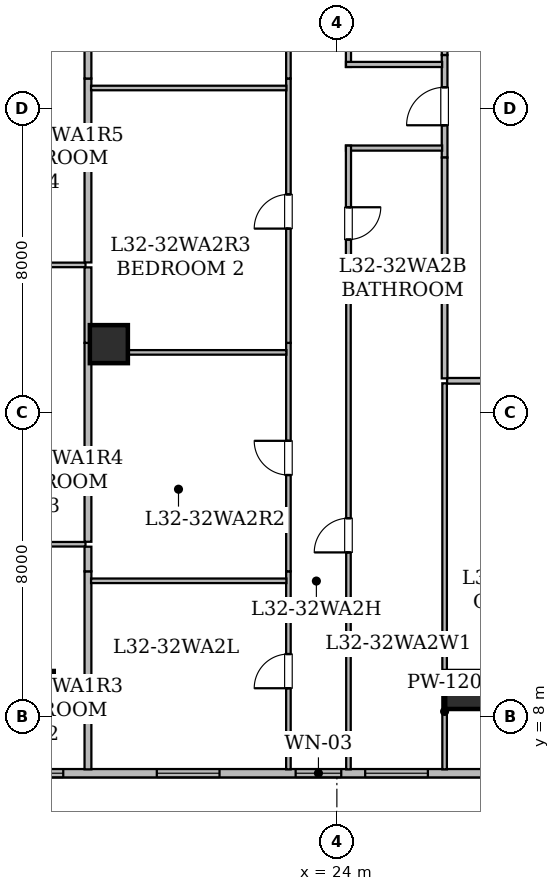
"""IFC4 building model, lengths in metres.
Left out: names, types, materials, properties, quantities, classifications, styles, units other than length and angle.
Written with IfcOpenShell. Run it as: python <this file> out.ifc"""

import sys

from ifc_helpers import new_model, si_unit, direction, frame, frame_2d, origin, origin_2d, place, context, subcontext, project, spatial, rectangle, hollow_rectangle, extrude, element, fill, save


model = new_model("IFC4")
c1 = context("Model", 3, precision=1e-05, world=origin(), true_north=direction((0.0, 1.0)))
c2 = subcontext(c1, "Body", "Model", "MODEL_VIEW")
j1 = project(units=[si_unit("LENGTHUNIT", "METRE"), si_unit("PLANEANGLEUNIT", "RADIAN")], contexts=[c1])
p1 = place(None, origin())
s1 = spatial("IfcSite", under=j1, at=p1, CompositionType="ELEMENT")
p2 = place(p1, origin())
s2 = spatial("IfcBuilding", under=s1, at=p2, CompositionType="ELEMENT")
p3 = place(p2, frame((0.0, 0.0, 127.45)))
s3 = spatial("IfcBuildingStorey", under=s2, at=p3, CompositionType="ELEMENT", Elevation=127.45)
for number, where, z_axis, x_axis in (
    (1, (16.05, 8.7, 0.0), (0.0, 0.0, 1.0), (1.0, 0.0, 0.0)),
    (2, (27.35, 8.7, 0.0), (0.0, 0.0, 1.0), (1.0, 0.0, 0.0)),
    (3, (18.0, 17.8, 0.0), (0.0, 0.0, 1.0), (1.0, 0.0, 0.0)),
):
    element("IfcColumn", number, at=place(p3, frame(where, z_axis=z_axis, x_axis=x_axis)), inside=s3, PredefinedType="COLUMN", context=c2, shape_type="SweptSolid", body=[
        extrude(hollow_rectangle(XDim=1.0, YDim=1.0, WallThickness=0.05, at=origin_2d()), origin(), (0.0, 0.0, 1.0), 3.65),
    ])
p4 = place(p3, frame((52.283, 6.51, 0.0), z_axis=(0.0, 0.0, 1.0), x_axis=(-1.0, 0.0, 0.0)))
e4 = element("IfcWall", 4, at=p4, inside=s3, PredefinedType="STANDARD", context=c2, shape_type="SweptSolid", body=[
    extrude(rectangle(XDim=38.568, YDim=0.22, at=frame_2d((19.284, 0.0))), origin(), (0.0, 0.0, 1.0), 3.43),
])
p5 = place(p4, frame((20.408, 0.0, 0.85)))
e5 = element("IfcOpeningElement", 5, at=p5, cuts=e4, PredefinedType="OPENING", context=c2, shape_type="SweptSolid", body=[
    extrude(rectangle(XDim=1.65, YDim=1.55, at=frame_2d((0.825, 0.775))), frame((0.0, 0.12, 0.0), z_axis=(0.0, -1.0, 0.0), x_axis=(1.0, 0.0, 0.0)), (0.0, 0.0, 1.0), 0.24),
])
p6 = place(p4, frame((35.483, 0.0, 0.85)))
e6 = element("IfcOpeningElement", 6, at=p6, cuts=e4, PredefinedType="OPENING", context=c2, shape_type="SweptSolid", body=[
    extrude(rectangle(XDim=1.65, YDim=1.55, at=frame_2d((0.825, 0.775))), frame((0.0, 0.12, 0.0), z_axis=(0.0, -1.0, 0.0), x_axis=(1.0, 0.0, 0.0)), (0.0, 0.0, 1.0), 0.24),
])
p7 = place(p4, frame((25.888, 0.0, 0.85)))
e7 = element("IfcOpeningElement", 7, at=p7, cuts=e4, PredefinedType="OPENING", context=c2, shape_type="SweptSolid", body=[
    extrude(rectangle(XDim=1.65, YDim=1.55, at=frame_2d((0.825, 0.775))), frame((0.0, 0.12, 0.0), z_axis=(0.0, -1.0, 0.0), x_axis=(1.0, 0.0, 0.0)), (0.0, 0.0, 1.0), 0.24),
])
p8 = place(p4, frame((28.168, 0.0, 0.8)))
e8 = element("IfcOpeningElement", 8, at=p8, cuts=e4, PredefinedType="OPENING", context=c2, shape_type="SweptSolid", body=[
    extrude(rectangle(XDim=1.2, YDim=1.5, at=frame_2d((0.6, 0.75))), frame((0.0, 0.12, 0.0), z_axis=(0.0, -1.0, 0.0), x_axis=(1.0, 0.0, 0.0)), (0.0, 0.0, 1.0), 0.24),
])
p9 = place(p4, frame((31.371, 0.0, 0.85)))
e9 = element("IfcOpeningElement", 9, at=p9, cuts=e4, PredefinedType="OPENING", context=c2, shape_type="SweptSolid", body=[
    extrude(rectangle(XDim=1.65, YDim=1.55, at=frame_2d((0.825, 0.775))), frame((0.0, 0.12, 0.0), z_axis=(0.0, -1.0, 0.0), x_axis=(1.0, 0.0, 0.0)), (0.0, 0.0, 1.0), 0.24),
])
p10 = place(p4, frame((13.143, 0.0, 0.85)))
e10 = element("IfcOpeningElement", 10, at=p10, cuts=e4, PredefinedType="OPENING", context=c2, shape_type="SweptSolid", body=[
    extrude(rectangle(XDim=1.65, YDim=1.55, at=frame_2d((0.825, 0.775))), frame((0.0, 0.12, 0.0), z_axis=(0.0, -1.0, 0.0), x_axis=(1.0, 0.0, 0.0)), (0.0, 0.0, 1.0), 0.24),
])
p11 = place(p4, frame((6.688, 0.0, 0.85)))
e11 = element("IfcOpeningElement", 11, at=p11, cuts=e4, PredefinedType="OPENING", context=c2, shape_type="SweptSolid", body=[
    extrude(rectangle(XDim=1.65, YDim=1.55, at=frame_2d((0.825, 0.775))), frame((0.0, 0.12, 0.0), z_axis=(0.0, -1.0, 0.0), x_axis=(1.0, 0.0, 0.0)), (0.0, 0.0, 1.0), 0.24),
])
p12 = place(p3, frame((35.514, 16.835, 0.0), z_axis=(0.0, 0.0, 1.0), x_axis=(-1.0, 0.0, 0.0)))
e12 = element("IfcWall", 12, at=p12, inside=s3, PredefinedType="STANDARD", context=c2, shape_type="SweptSolid", body=[
    extrude(rectangle(XDim=8.614, YDim=0.15, at=frame_2d((4.307, 0.0))), origin(), (0.0, 0.0, 1.0), 2.647),
])
p13 = place(p12, frame((3.753, 0.0, 0.0)))
e13 = element("IfcOpeningElement", 13, at=p13, cuts=e12, PredefinedType="OPENING", context=c2, shape_type="SweptSolid", body=[
    extrude(rectangle(XDim=1.15, YDim=2.2, at=frame_2d((0.575, 1.1))), frame((0.0, 0.085, 0.0), z_axis=(0.0, -1.0, 0.0), x_axis=(1.0, 0.0, 0.0)), (0.0, 0.0, 1.0), 0.17),
])
p14 = place(p3, frame((26.835, 16.9, 0.0), z_axis=(0.0, 0.0, 1.0), x_axis=(0.0, 1.0, 0.0)))
e14 = element("IfcWall", 14, at=p14, inside=s3, PredefinedType="STANDARD", context=c2, shape_type="SweptSolid", body=[
    extrude(rectangle(XDim=2.343, YDim=0.15, at=frame_2d((1.171, 0.0))), origin(), (0.0, 0.0, 1.0), 2.647),
])
p15 = place(p3, frame((26.835, 22.71, 0.0), z_axis=(0.0, 0.0, 1.0), x_axis=(0.0, 1.0, 0.0)))
e15 = element("IfcWall", 15, at=p15, inside=s3, PredefinedType="STANDARD", context=c2, shape_type="SweptSolid", body=[
    extrude(rectangle(XDim=2.698, YDim=0.15, at=frame_2d((1.349, 0.0))), origin(), (0.0, 0.0, 1.0), 3.43),
])
p16 = place(p15, frame((0.849, 0.0, 0.0)))
e16 = element("IfcOpeningElement", 16, at=p16, cuts=e15, PredefinedType="OPENING", context=c2, shape_type="SweptSolid", body=[
    extrude(rectangle(XDim=1.0, YDim=2.15, at=frame_2d((0.5, 1.075))), frame((0.0, 0.085, 0.0), z_axis=(0.0, -1.0, 0.0), x_axis=(1.0, 0.0, 0.0)), (0.0, 0.0, 1.0), 0.17),
])
p17 = place(p3, frame((26.835, 19.243, 0.0), z_axis=(0.0, 0.0, 1.0), x_axis=(0.0, 1.0, 0.0)))
e17 = element("IfcWall", 17, at=p17, inside=s3, PredefinedType="STANDARD", context=c2, shape_type="SweptSolid", body=[
    extrude(rectangle(XDim=3.467, YDim=0.15, at=frame_2d((1.733, 0.0))), origin(), (0.0, 0.0, 1.0), 3.43),
])
p18 = place(p3, frame((26.835, 25.408, 0.0), z_axis=(0.0, 0.0, 1.0), x_axis=(0.0, 1.0, 0.0)))
e18 = element("IfcWall", 18, at=p18, inside=s3, PredefinedType="STANDARD", context=c2, shape_type="SweptSolid", body=[
    extrude(rectangle(XDim=4.467, YDim=0.15, at=frame_2d((2.233, 0.0))), origin(), (0.0, 0.0, 1.0), 3.107),
])
p19 = place(p3, frame((26.835, 6.612, 0.0), z_axis=(0.0, 0.0, 1.0), x_axis=(0.0, 1.0, 0.0)))
e19 = element("IfcWall", 19, at=p19, inside=s3, PredefinedType="PARTITIONING", context=c2, shape_type="SweptSolid", body=[
    extrude(rectangle(XDim=10.158, YDim=0.12, at=frame_2d((5.079, 0.0))), origin(), (0.0, 0.0, 1.0), 2.876),
])
p20 = place(p3, frame((14.286, 12.535, 0.0), z_axis=(0.0, 0.0, 1.0), x_axis=(1.0, 0.0, 0.0)))
e20 = element("IfcWall", 20, at=p20, inside=s3, PredefinedType="PARTITIONING", context=c2, shape_type="SweptSolid", body=[
    extrude(rectangle(XDim=3.099, YDim=0.12, at=frame_2d((1.55, 0.0))), origin(), (0.0, 0.0, 1.0), 2.647),
])
p21 = place(p3, frame((17.45, 11.822, 0.0), z_axis=(0.0, 0.0, 1.0), x_axis=(0.0, -1.0, 0.0)))
e21 = element("IfcWall", 21, at=p21, inside=s3, PredefinedType="STANDARD", context=c2, shape_type="SweptSolid", body=[
    extrude(rectangle(XDim=5.21, YDim=0.18, at=frame_2d((2.605, 0.0))), origin(), (0.0, 0.0, 1.0), 2.876),
])
p22 = place(p3, frame((17.45, 12.47, 0.0), z_axis=(0.0, 0.0, 1.0), x_axis=(0.0, -1.0, 0.0)))
e22 = element("IfcWall", 22, at=p22, inside=s3, PredefinedType="STANDARD", context=c2, shape_type="SweptSolid", body=[
    extrude(rectangle(XDim=0.648, YDim=0.18, at=frame_2d((0.324, 0.0))), origin(), (0.0, 0.0, 1.0), 3.43),
])
p23 = place(p3, frame((14.286, 19.885, 0.0), z_axis=(0.0, 0.0, 1.0), x_axis=(1.0, 0.0, 0.0)))
e23 = element("IfcWall", 23, at=p23, inside=s3, PredefinedType="PARTITIONING", context=c2, shape_type="SweptSolid", body=[
    extrude(rectangle(XDim=3.099, YDim=0.12, at=frame_2d((1.55, 0.0))), origin(), (0.0, 0.0, 1.0), 3.43),
])
p24 = place(p3, frame((17.45, 17.833, 0.0), z_axis=(0.0, 0.0, 1.0), x_axis=(0.0, -1.0, 0.0)))
e24 = element("IfcWall", 24, at=p24, inside=s3, PredefinedType="STANDARD", context=c2, shape_type="SweptSolid", body=[
    extrude(rectangle(XDim=5.233, YDim=0.18, at=frame_2d((2.616, 0.0))), origin(), (0.0, 0.0, 1.0), 2.647),
])
p25 = place(p3, frame((17.45, 19.82, 0.0), z_axis=(0.0, 0.0, 1.0), x_axis=(0.0, -1.0, 0.0)))
e25 = element("IfcWall", 25, at=p25, inside=s3, PredefinedType="STANDARD", context=c2, shape_type="SweptSolid", body=[
    extrude(rectangle(XDim=1.987, YDim=0.18, at=frame_2d((0.994, 0.0))), origin(), (0.0, 0.0, 1.0), 2.647),
])
p26 = place(p3, frame((17.45, 24.789, 0.0), z_axis=(0.0, 0.0, 1.0), x_axis=(0.0, -1.0, 0.0)))
e26 = element("IfcWall", 26, at=p26, inside=s3, PredefinedType="STANDARD", context=c2, shape_type="SweptSolid", body=[
    extrude(rectangle(XDim=4.839, YDim=0.18, at=frame_2d((2.419, 0.0))), origin(), (0.0, 0.0, 1.0), 3.43),
])
p27 = place(p3, frame((17.45, 28.56, 0.0), z_axis=(0.0, 0.0, 1.0), x_axis=(0.0, -1.0, 0.0)))
e27 = element("IfcWall", 27, at=p27, inside=s3, PredefinedType="STANDARD", context=c2, shape_type="SweptSolid", body=[
    extrude(rectangle(XDim=3.771, YDim=0.18, at=frame_2d((1.885, 0.0))), origin(), (0.0, 0.0, 1.0), 3.43),
])
p28 = place(p3, frame((24.305, 6.612, 0.0), z_axis=(0.0, 0.0, 1.0), x_axis=(0.0, 1.0, 0.0)))
e28 = element("IfcWall", 28, at=p28, inside=s3, PredefinedType="PARTITIONING", context=c2, shape_type="SweptSolid", body=[
    extrude(rectangle(XDim=12.317, YDim=0.12, at=frame_2d((6.158, 0.0))), origin(), (0.0, 0.0, 1.0), 2.647),
])
p29 = place(p28, frame((5.708, 0.0, 0.0)))
e29 = element("IfcOpeningElement", 29, at=p29, cuts=e28, PredefinedType="OPENING", context=c2, shape_type="SweptSolid", body=[
    extrude(rectangle(XDim=0.9, YDim=2.1, at=frame_2d((0.45, 1.05))), frame((0.0, 0.07, 0.0), z_axis=(0.0, -1.0, 0.0), x_axis=(1.0, 0.0, 0.0)), (0.0, 0.0, 1.0), 0.14),
])
p30 = place(p3, frame((24.37, 18.994, 0.0), z_axis=(0.0, 0.0, 1.0), x_axis=(1.0, 0.0, 0.0)))
e30 = element("IfcWall", 30, at=p30, inside=s3, PredefinedType="PARTITIONING", context=c2, shape_type="SweptSolid", body=[
    extrude(rectangle(XDim=2.4, YDim=0.135, at=frame_2d((1.2, 0.0))), origin(), (0.0, 0.0, 1.0), 2.647),
])
p31 = place(p3, frame((26.77, 22.959, 0.0), z_axis=(0.0, 0.0, 1.0), x_axis=(-1.0, 0.0, 0.0)))
e31 = element("IfcWall", 31, at=p31, inside=s3, PredefinedType="PARTITIONING", context=c2, shape_type="SweptSolid", body=[
    extrude(rectangle(XDim=2.53, YDim=0.135, at=frame_2d((1.265, 0.0))), origin(), (0.0, 0.0, 1.0), 3.43),
])
p32 = place(p3, frame((24.305, 23.024, 0.0), z_axis=(0.0, 0.0, 1.0), x_axis=(0.0, -1.0, 0.0)))
e32 = element("IfcWall", 32, at=p32, inside=s3, PredefinedType="PARTITIONING", context=c2, shape_type="SweptSolid", body=[
    extrude(rectangle(XDim=4.095, YDim=0.135, at=frame_2d((2.047, 0.0))), origin(), (0.0, 0.0, 1.0), 3.43),
])
p33 = place(p32, frame((1.622, 0.0, 0.0)))
e33 = element("IfcOpeningElement", 33, at=p33, cuts=e32, PredefinedType="OPENING", context=c2, shape_type="SweptSolid", body=[
    extrude(rectangle(XDim=0.85, YDim=2.1, at=frame_2d((0.425, 1.05))), frame((0.0, 0.077, 0.0), z_axis=(0.0, -1.0, 0.0), x_axis=(1.0, 0.0, 0.0)), (0.0, 0.0, 1.0), 0.155),
])
p34 = place(p3, frame((24.305, 30.189, 0.0), z_axis=(0.0, 0.0, 1.0), x_axis=(0.0, -1.0, 0.0)))
e34 = element("IfcWall", 34, at=p34, inside=s3, PredefinedType="PARTITIONING", context=c2, shape_type="SweptSolid", body=[
    extrude(rectangle(XDim=5.095, YDim=0.135, at=frame_2d((2.547, 0.0))), origin(), (0.0, 0.0, 1.0), 3.107),
])
p35 = place(p34, frame((2.123, 0.0, 0.0)))
e35 = element("IfcOpeningElement", 35, at=p35, cuts=e34, PredefinedType="OPENING", context=c2, shape_type="SweptSolid", body=[
    extrude(rectangle(XDim=0.85, YDim=2.1, at=frame_2d((0.425, 1.05))), frame((0.0, 0.077, 0.0), z_axis=(0.0, -1.0, 0.0), x_axis=(1.0, 0.0, 0.0)), (0.0, 0.0, 1.0), 0.155),
])
p36 = place(p3, frame((24.24, 25.159, 0.0), z_axis=(0.0, 0.0, 1.0), x_axis=(1.0, 0.0, 0.0)))
e36 = element("IfcWall", 36, at=p36, inside=s3, PredefinedType="PARTITIONING", context=c2, shape_type="SweptSolid", body=[
    extrude(rectangle(XDim=2.53, YDim=0.135, at=frame_2d((1.265, 0.0))), origin(), (0.0, 0.0, 1.0), 3.43),
])
p37 = place(p3, frame((22.725, 6.612, 0.0), z_axis=(0.0, 0.0, 1.0), x_axis=(0.0, 1.0, 0.0)))
e37 = element("IfcWall", 37, at=p37, inside=s3, PredefinedType="PARTITIONING", context=c2, shape_type="SweptSolid", body=[
    extrude(rectangle(XDim=5.21, YDim=0.12, at=frame_2d((2.605, 0.0))), origin(), (0.0, 0.0, 1.0), 2.876),
])
p38 = place(p37, frame((2.134, 0.0, 0.0)))
e38 = element("IfcOpeningElement", 38, at=p38, cuts=e37, PredefinedType="OPENING", context=c2, shape_type="SweptSolid", body=[
    extrude(rectangle(XDim=0.9, YDim=2.1, at=frame_2d((0.45, 1.05))), frame((0.0, 0.07, 0.0), z_axis=(0.0, -1.0, 0.0), x_axis=(1.0, 0.0, 0.0)), (0.0, 0.0, 1.0), 0.14),
])
p39 = place(p3, frame((22.725, 11.822, 0.0), z_axis=(0.0, 0.0, 1.0), x_axis=(0.0, 1.0, 0.0)))
e39 = element("IfcWall", 39, at=p39, inside=s3, PredefinedType="PARTITIONING", context=c2, shape_type="SweptSolid", body=[
    extrude(rectangle(XDim=6.011, YDim=0.12, at=frame_2d((3.005, 0.0))), origin(), (0.0, 0.0, 1.0), 3.43),
])
p40 = place(p39, frame((2.534, 0.0, 0.0)))
e40 = element("IfcOpeningElement", 40, at=p40, cuts=e39, PredefinedType="OPENING", context=c2, shape_type="SweptSolid", body=[
    extrude(rectangle(XDim=0.9, YDim=2.1, at=frame_2d((0.45, 1.05))), frame((0.0, 0.07, 0.0), z_axis=(0.0, -1.0, 0.0), x_axis=(1.0, 0.0, 0.0)), (0.0, 0.0, 1.0), 0.14),
])
p41 = place(p3, frame((22.725, 17.833, 0.0), z_axis=(0.0, 0.0, 1.0), x_axis=(0.0, 1.0, 0.0)))
e41 = element("IfcWall", 41, at=p41, inside=s3, PredefinedType="PARTITIONING", context=c2, shape_type="SweptSolid", body=[
    extrude(rectangle(XDim=6.956, YDim=0.12, at=frame_2d((3.478, 0.0))), origin(), (0.0, 0.0, 1.0), 2.647),
])
p42 = place(p41, frame((3.007, 0.0, 0.0)))
e42 = element("IfcOpeningElement", 42, at=p42, cuts=e41, PredefinedType="OPENING", context=c2, shape_type="SweptSolid", body=[
    extrude(rectangle(XDim=0.9, YDim=2.1, at=frame_2d((0.45, 1.05))), frame((0.0, 0.07, 0.0), z_axis=(0.0, -1.0, 0.0), x_axis=(1.0, 0.0, 0.0)), (0.0, 0.0, 1.0), 0.14),
])
p43 = place(p3, frame((22.725, 24.789, 0.0), z_axis=(0.0, 0.0, 1.0), x_axis=(0.0, 1.0, 0.0)))
e43 = element("IfcWall", 43, at=p43, inside=s3, PredefinedType="PARTITIONING", context=c2, shape_type="SweptSolid", body=[
    extrude(rectangle(XDim=4.117, YDim=0.12, at=frame_2d((2.059, 0.0))), origin(), (0.0, 0.0, 1.0), 3.107),
])
p44 = place(p43, frame((1.588, 0.0, 0.0)))
e44 = element("IfcOpeningElement", 44, at=p44, cuts=e43, PredefinedType="OPENING", context=c2, shape_type="SweptSolid", body=[
    extrude(rectangle(XDim=0.9, YDim=2.1, at=frame_2d((0.45, 1.05))), frame((0.0, 0.07, 0.0), z_axis=(0.0, -1.0, 0.0), x_axis=(1.0, 0.0, 0.0)), (0.0, 0.0, 1.0), 0.14),
])
p45 = place(p3, frame((17.532, 11.573, 0.0), z_axis=(0.0, 0.0, 1.0), x_axis=(1.0, 0.0, 0.0)))
e45 = element("IfcWall", 45, at=p45, inside=s3, PredefinedType="PARTITIONING", context=c2, shape_type="SweptSolid", body=[
    extrude(rectangle(XDim=5.139, YDim=0.12, at=frame_2d((2.569, 0.0))), origin(), (0.0, 0.0, 1.0), 3.43),
])
for number, where, z_axis, x_axis in (
    (46, (17.532, 17.583, 0.0), (0.0, 0.0, 1.0), (1.0, 0.0, 0.0)),
    (47, (17.532, 24.54, 0.0), (0.0, 0.0, 1.0), (1.0, 0.0, 0.0)),
):
    element("IfcWall", number, at=place(p3, frame(where, z_axis=z_axis, x_axis=x_axis)), inside=s3, PredefinedType="PARTITIONING", context=c2, shape_type="SweptSolid", body=[
        extrude(rectangle(XDim=5.139, YDim=0.12, at=frame_2d((2.569, 0.0))), origin(), (0.0, 0.0, 1.0), 2.647),
    ])
p46 = place(p6, origin())
e48 = element("IfcWindow", 48, at=p46, inside=s3, PartitioningType="SINGLE_PANEL", PredefinedType="WINDOW", context=c2, shape_type="SweptSolid", body=[
    extrude(rectangle(XDim=1.65, YDim=1.55, at=frame_2d((0.825, 0.775))), frame((0.0, 0.03, 0.0), z_axis=(0.0, -1.0, 0.0), x_axis=(1.0, 0.0, 0.0)), (0.0, 0.0, 1.0), 0.06),
])
fill(e6, e48)
p47 = place(p7, origin())
e49 = element("IfcWindow", 49, at=p47, inside=s3, PartitioningType="SINGLE_PANEL", PredefinedType="WINDOW", context=c2, shape_type="SweptSolid", body=[
    extrude(rectangle(XDim=1.65, YDim=1.55, at=frame_2d((0.825, 0.775))), frame((0.0, 0.03, 0.0), z_axis=(0.0, -1.0, 0.0), x_axis=(1.0, 0.0, 0.0)), (0.0, 0.0, 1.0), 0.06),
])
fill(e7, e49)
p48 = place(p8, origin())
e50 = element("IfcWindow", 50, at=p48, inside=s3, PartitioningType="SINGLE_PANEL", PredefinedType="WINDOW", context=c2, shape_type="SweptSolid", body=[
    extrude(rectangle(XDim=1.2, YDim=1.5, at=frame_2d((0.6, 0.75))), frame((0.0, 0.03, 0.0), z_axis=(0.0, -1.0, 0.0), x_axis=(1.0, 0.0, 0.0)), (0.0, 0.0, 1.0), 0.06),
])
fill(e8, e50)
p49 = place(p9, origin())
e51 = element("IfcWindow", 51, at=p49, inside=s3, PartitioningType="SINGLE_PANEL", PredefinedType="WINDOW", context=c2, shape_type="SweptSolid", body=[
    extrude(rectangle(XDim=1.65, YDim=1.55, at=frame_2d((0.825, 0.775))), frame((0.0, 0.03, 0.0), z_axis=(0.0, -1.0, 0.0), x_axis=(1.0, 0.0, 0.0)), (0.0, 0.0, 1.0), 0.06),
])
fill(e9, e51)
p50 = place(p16, origin())
e52 = element("IfcDoor", 52, at=p50, inside=s3, OperationType="SINGLE_SWING_LEFT", PredefinedType="DOOR", context=c2, shape_type="SweptSolid", body=[
    extrude(rectangle(XDim=1.0, YDim=2.15, at=frame_2d((0.5, 1.075))), frame((0.0, 0.025, 0.0), z_axis=(0.0, -1.0, 0.0), x_axis=(1.0, 0.0, 0.0)), (0.0, 0.0, 1.0), 0.05),
])
fill(e16, e52)
p51 = place(p29, origin())
e53 = element("IfcDoor", 53, at=p51, inside=s3, OperationType="SINGLE_SWING_LEFT", PredefinedType="DOOR", context=c2, shape_type="SweptSolid", body=[
    extrude(rectangle(XDim=0.9, YDim=2.1, at=frame_2d((0.45, 1.05))), frame((0.0, 0.025, 0.0), z_axis=(0.0, -1.0, 0.0), x_axis=(1.0, 0.0, 0.0)), (0.0, 0.0, 1.0), 0.05),
])
fill(e29, e53)
p52 = place(p33, origin())
e54 = element("IfcDoor", 54, at=p52, inside=s3, OperationType="SINGLE_SWING_LEFT", PredefinedType="DOOR", context=c2, shape_type="SweptSolid", body=[
    extrude(rectangle(XDim=0.85, YDim=2.1, at=frame_2d((0.425, 1.05))), frame((0.0, 0.025, 0.0), z_axis=(0.0, -1.0, 0.0), x_axis=(1.0, 0.0, 0.0)), (0.0, 0.0, 1.0), 0.05),
])
fill(e33, e54)
p53 = place(p38, origin())
e55 = element("IfcDoor", 55, at=p53, inside=s3, OperationType="SINGLE_SWING_LEFT", PredefinedType="DOOR", context=c2, shape_type="SweptSolid", body=[
    extrude(rectangle(XDim=0.9, YDim=2.1, at=frame_2d((0.45, 1.05))), frame((0.0, 0.025, 0.0), z_axis=(0.0, -1.0, 0.0), x_axis=(1.0, 0.0, 0.0)), (0.0, 0.0, 1.0), 0.05),
])
fill(e38, e55)
p54 = place(p40, origin())
e56 = element("IfcDoor", 56, at=p54, inside=s3, OperationType="SINGLE_SWING_RIGHT", PredefinedType="DOOR", context=c2, shape_type="SweptSolid", body=[
    extrude(rectangle(XDim=0.9, YDim=2.1, at=frame_2d((0.45, 1.05))), frame((0.0, 0.025, 0.0), z_axis=(0.0, -1.0, 0.0), x_axis=(1.0, 0.0, 0.0)), (0.0, 0.0, 1.0), 0.05),
])
fill(e40, e56)
p55 = place(p42, origin())
e57 = element("IfcDoor", 57, at=p55, inside=s3, OperationType="SINGLE_SWING_LEFT", PredefinedType="DOOR", context=c2, shape_type="SweptSolid", body=[
    extrude(rectangle(XDim=0.9, YDim=2.1, at=frame_2d((0.45, 1.05))), frame((0.0, 0.025, 0.0), z_axis=(0.0, -1.0, 0.0), x_axis=(1.0, 0.0, 0.0)), (0.0, 0.0, 1.0), 0.05),
])
fill(e42, e57)
save(model, sys.argv[1])
